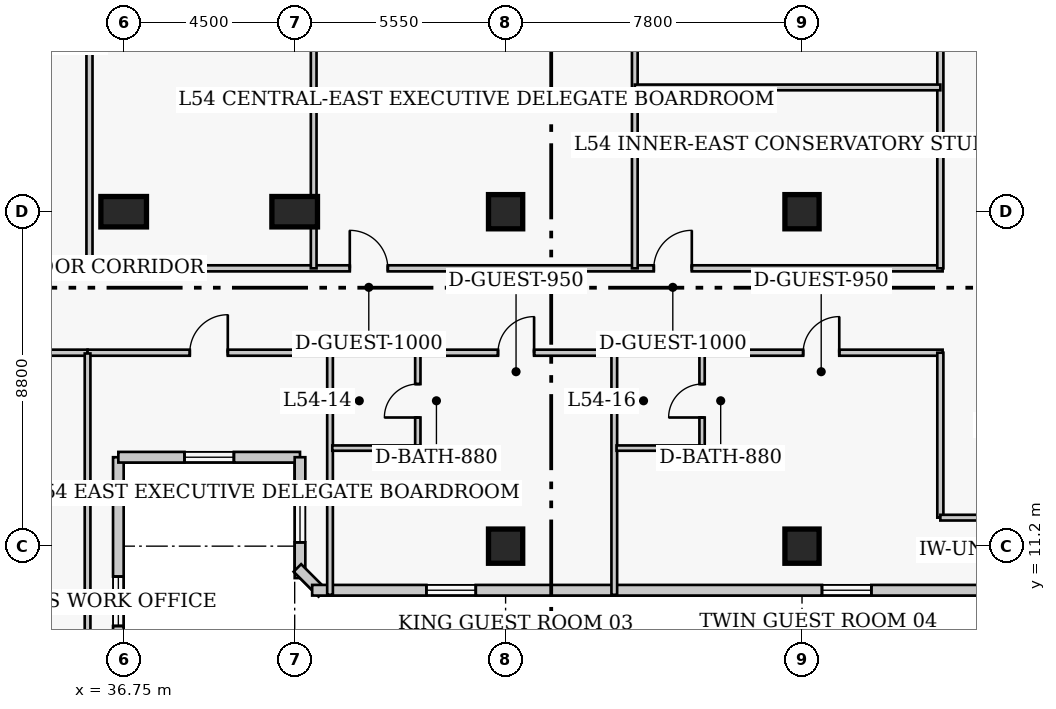
"""IFC4 building model, lengths in metres.
Left out: names, types, materials, properties, quantities, classifications, styles, units other than length and angle.
Written with IfcOpenShell. Run it as: python <this file> out.ifc"""

import sys

from ifc_helpers import new_model, si_unit, direction, frame, frame_2d, origin, origin_2d, place, context, subcontext, project, spatial, rectangle, extrude, element, fill, save


model = new_model("IFC4")
c1 = context("Model", 3, precision=1e-05, world=origin(), true_north=direction((0.0, 1.0)))
c2 = subcontext(c1, "Body", "Model", "MODEL_VIEW")
j1 = project(units=[si_unit("LENGTHUNIT", "METRE"), si_unit("PLANEANGLEUNIT", "RADIAN")], contexts=[c1])
p1 = place(None, origin())
s1 = spatial("IfcSite", under=j1, at=p1, CompositionType="ELEMENT")
p2 = place(p1, origin())
s2 = spatial("IfcBuilding", under=s1, at=p2, CompositionType="ELEMENT")
p3 = place(p2, frame((0.0, 0.0, 216.3)))
s3 = spatial("IfcBuildingStorey", under=s2, at=p3, CompositionType="ELEMENT", Elevation=216.3)
for number, where, z_axis, x_axis in (
    (1, (36.75, 20.0, 0.0), (0.0, 0.0, 1.0), (1.0, 0.0, 0.0)),
    (2, (41.25, 20.0, 0.0), (0.0, 0.0, 1.0), (1.0, 0.0, 0.0)),
):
    element("IfcColumn", number, at=place(p3, frame(where, z_axis=z_axis, x_axis=x_axis)), inside=s3, PredefinedType="COLUMN", context=c2, shape_type="SweptSolid", body=[
        extrude(rectangle(XDim=1.2, YDim=0.8, at=origin_2d()), origin(), (0.0, 0.0, 1.0), 3.9),
    ])
for number, where, z_axis, x_axis in (
    (3, (46.8, 11.2, 0.0), (0.0, 0.0, 1.0), (1.0, 0.0, 0.0)),
    (4, (46.8, 20.0, 0.0), (0.0, 0.0, 1.0), (1.0, 0.0, 0.0)),
    (5, (54.6, 11.2, 0.0), (0.0, 0.0, 1.0), (1.0, 0.0, 0.0)),
    (6, (54.6, 20.0, 0.0), (0.0, 0.0, 1.0), (1.0, 0.0, 0.0)),
):
    element("IfcColumn", number, at=place(p3, frame(where, z_axis=z_axis, x_axis=x_axis)), inside=s3, PredefinedType="COLUMN", context=c2, shape_type="SweptSolid", body=[
        extrude(rectangle(XDim=0.9, YDim=0.9, at=origin_2d()), origin(), (0.0, 0.0, 1.0), 3.9),
    ])
p4 = place(p3, frame((36.61, 5.96, 0.0), z_axis=(0.0, 0.0, 1.0), x_axis=(0.0, 1.0, 0.0)))
e7 = element("IfcWall", 7, at=p4, inside=s3, PredefinedType="SOLIDWALL", context=c2, shape_type="SweptSolid", body=[
    extrude(rectangle(XDim=7.58, YDim=0.28, at=frame_2d((3.79, 0.0))), origin(), (0.0, 0.0, 1.0), 3.65),
])
p5 = place(p4, frame((3.14, 0.0, 0.85)))
e8 = element("IfcOpeningElement", 8, at=p5, cuts=e7, PredefinedType="OPENING", context=c2, shape_type="SweptSolid", body=[
    extrude(rectangle(XDim=1.3, YDim=1.7, at=frame_2d((0.65, 0.85))), frame((0.0, 0.15, 0.0), z_axis=(0.0, -1.0, 0.0), x_axis=(1.0, 0.0, 0.0)), (0.0, 0.0, 1.0), 0.3),
])
p6 = place(p3, frame((36.61, 13.54, 0.0), z_axis=(0.0, 0.0, 1.0), x_axis=(1.0, 0.0, 0.0)))
e9 = element("IfcWall", 9, at=p6, inside=s3, PredefinedType="SOLIDWALL", context=c2, shape_type="SweptSolid", body=[
    extrude(rectangle(XDim=4.78, YDim=0.28, at=frame_2d((2.39, 0.0))), origin(), (0.0, 0.0, 1.0), 3.65),
])
p7 = place(p6, frame((1.74, 0.0, 0.85)))
e10 = element("IfcOpeningElement", 10, at=p7, cuts=e9, PredefinedType="OPENING", context=c2, shape_type="SweptSolid", body=[
    extrude(rectangle(XDim=1.3, YDim=1.7, at=frame_2d((0.65, 0.85))), frame((0.0, 0.15, 0.0), z_axis=(0.0, -1.0, 0.0), x_axis=(1.0, 0.0, 0.0)), (0.0, 0.0, 1.0), 0.3),
])
p8 = place(p3, frame((41.39, 13.54, 0.0), z_axis=(0.0, 0.0, 1.0), x_axis=(0.0, -1.0, 0.0)))
e11 = element("IfcWall", 11, at=p8, inside=s3, PredefinedType="SOLIDWALL", context=c2, shape_type="SweptSolid", body=[
    extrude(rectangle(XDim=3.18, YDim=0.28, at=frame_2d((1.59, 0.0))), origin(), (0.0, 0.0, 1.0), 3.65),
])
p9 = place(p8, frame((0.94, 0.0, 0.85)))
e12 = element("IfcOpeningElement", 12, at=p9, cuts=e11, PredefinedType="OPENING", context=c2, shape_type="SweptSolid", body=[
    extrude(rectangle(XDim=1.3, YDim=1.7, at=frame_2d((0.65, 0.85))), frame((0.0, 0.15, 0.0), z_axis=(0.0, -1.0, 0.0), x_axis=(1.0, 0.0, 0.0)), (0.0, 0.0, 1.0), 0.3),
])
p10 = place(p3, frame((41.321, 10.627, 0.0), z_axis=(0.0, 0.0, 1.0), x_axis=(0.707106781187, -0.707106781187, 0.0)))
e13 = element("IfcWall", 13, at=p10, inside=s3, PredefinedType="SOLIDWALL", context=c2, shape_type="SweptSolid", body=[
    extrude(rectangle(XDim=0.928, YDim=0.28, at=frame_2d((0.464, 0.0))), origin(), (0.0, 0.0, 1.0), 3.65),
])
p11 = place(p3, frame((41.71, 10.04, 0.0), z_axis=(0.0, 0.0, 1.0), x_axis=(1.0, 0.0, 0.0)))
e14 = element("IfcWall", 14, at=p11, inside=s3, PredefinedType="SOLIDWALL", context=c2, shape_type="SweptSolid", body=[
    extrude(rectangle(XDim=25.83, YDim=0.28, at=frame_2d((12.915, 0.0))), origin(), (0.0, 0.0, 1.0), 3.65),
])
p12 = place(p11, frame((3.005, 0.0, 0.85)))
e15 = element("IfcOpeningElement", 15, at=p12, cuts=e14, PredefinedType="OPENING", context=c2, shape_type="SweptSolid", body=[
    extrude(rectangle(XDim=1.3, YDim=1.7, at=frame_2d((0.65, 0.85))), frame((0.0, 0.15, 0.0), z_axis=(0.0, -1.0, 0.0), x_axis=(1.0, 0.0, 0.0)), (0.0, 0.0, 1.0), 0.3),
])
p13 = place(p11, frame((13.415, 0.0, 0.85)))
e16 = element("IfcOpeningElement", 16, at=p13, cuts=e14, PredefinedType="OPENING", context=c2, shape_type="SweptSolid", body=[
    extrude(rectangle(XDim=1.3, YDim=1.7, at=frame_2d((0.65, 0.85))), frame((0.0, 0.15, 0.0), z_axis=(0.0, -1.0, 0.0), x_axis=(1.0, 0.0, 0.0)), (0.0, 0.0, 1.0), 0.3),
])
p14 = place(p11, frame((21.525, 0.0, 0.85)))
e17 = element("IfcOpeningElement", 17, at=p14, cuts=e14, PredefinedType="OPENING", context=c2, shape_type="SweptSolid", body=[
    extrude(rectangle(XDim=1.3, YDim=1.7, at=frame_2d((0.65, 0.85))), frame((0.0, 0.15, 0.0), z_axis=(0.0, -1.0, 0.0), x_axis=(1.0, 0.0, 0.0)), (0.0, 0.0, 1.0), 0.3),
])
p15 = place(p3, frame((35.85, 18.51, 0.0), z_axis=(0.0, 0.0, 1.0), x_axis=(1.0, 0.0, 0.0)))
e18 = element("IfcWall", 18, at=p15, inside=s3, PredefinedType="PARTITIONING", context=c2, shape_type="SweptSolid", body=[
    extrude(rectangle(XDim=22.45, YDim=0.16, at=frame_2d((11.225, 0.0))), origin(), (0.0, 0.0, 1.0), 3.65),
])
p16 = place(p15, frame((6.85, 0.0, 0.0)))
e19 = element("IfcOpeningElement", 19, at=p16, cuts=e18, PredefinedType="OPENING", context=c2, shape_type="SweptSolid", body=[
    extrude(rectangle(XDim=1.0, YDim=2.15, at=frame_2d((0.5, 1.075))), frame((0.0, 0.09, 0.0), z_axis=(0.0, -1.0, 0.0), x_axis=(1.0, 0.0, 0.0)), (0.0, 0.0, 1.0), 0.18),
])
p17 = place(p15, frame((14.85, 0.0, 0.0)))
e20 = element("IfcOpeningElement", 20, at=p17, cuts=e18, PredefinedType="OPENING", context=c2, shape_type="SweptSolid", body=[
    extrude(rectangle(XDim=1.0, YDim=2.15, at=frame_2d((0.5, 1.075))), frame((0.0, 0.09, 0.0), z_axis=(0.0, -1.0, 0.0), x_axis=(1.0, 0.0, 0.0)), (0.0, 0.0, 1.0), 0.18),
])
p18 = place(p3, frame((35.85, 18.51, 0.0), z_axis=(0.0, 0.0, 1.0), x_axis=(0.0, 1.0, 0.0)))
e21 = element("IfcWall", 21, at=p18, inside=s3, PredefinedType="PARTITIONING", context=c2, shape_type="SweptSolid", body=[
    extrude(rectangle(XDim=11.04, YDim=0.16, at=frame_2d((5.52, 0.0))), origin(), (0.0, 0.0, 1.0), 3.65),
])
p19 = place(p3, frame((19.1, 16.29, 0.0), z_axis=(0.0, 0.0, 1.0), x_axis=(1.0, 0.0, 0.0)))
e22 = element("IfcWall", 22, at=p19, inside=s3, PredefinedType="PARTITIONING", context=c2, shape_type="SweptSolid", body=[
    extrude(rectangle(XDim=16.7, YDim=0.16, at=frame_2d((8.35, 0.0))), origin(), (0.0, 0.0, 1.0), 3.65),
])
p20 = place(p19, frame((3.488, 0.0, 0.0)))
e23 = element("IfcOpeningElement", 23, at=p20, cuts=e22, PredefinedType="OPENING", context=c2, shape_type="SweptSolid", body=[
    extrude(rectangle(XDim=1.0, YDim=2.15, at=frame_2d((0.5, 1.075))), frame((0.0, 0.09, 0.0), z_axis=(0.0, -1.0, 0.0), x_axis=(1.0, 0.0, 0.0)), (0.0, 0.0, 1.0), 0.18),
])
p21 = place(p19, frame((9.06, 0.0, 0.0)))
e24 = element("IfcOpeningElement", 24, at=p21, cuts=e22, PredefinedType="OPENING", context=c2, shape_type="SweptSolid", body=[
    extrude(rectangle(XDim=0.95, YDim=2.1, at=frame_2d((0.475, 1.05))), frame((0.0, 0.09, 0.0), z_axis=(0.0, -1.0, 0.0), x_axis=(1.0, 0.0, 0.0)), (0.0, 0.0, 1.0), 0.18),
])
p22 = place(p19, frame((13.427, 0.0, 0.0)))
e25 = element("IfcOpeningElement", 25, at=p22, cuts=e22, PredefinedType="OPENING", context=c2, shape_type="SweptSolid", body=[
    extrude(rectangle(XDim=1.0, YDim=2.15, at=frame_2d((0.5, 1.075))), frame((0.0, 0.09, 0.0), z_axis=(0.0, -1.0, 0.0), x_axis=(1.0, 0.0, 0.0)), (0.0, 0.0, 1.0), 0.18),
])
p23 = place(p3, frame((35.8, 16.29, 0.0), z_axis=(0.0, 0.0, 1.0), x_axis=(1.0, 0.0, 0.0)))
e26 = element("IfcWall", 26, at=p23, inside=s3, PredefinedType="PARTITIONING", context=c2, shape_type="SweptSolid", body=[
    extrude(rectangle(XDim=22.5, YDim=0.16, at=frame_2d((11.25, 0.0))), origin(), (0.0, 0.0, 1.0), 3.65),
])
p24 = place(p23, frame((2.69, 0.0, 0.0)))
e27 = element("IfcOpeningElement", 27, at=p24, cuts=e26, PredefinedType="OPENING", context=c2, shape_type="SweptSolid", body=[
    extrude(rectangle(XDim=1.0, YDim=2.15, at=frame_2d((0.5, 1.075))), frame((0.0, 0.09, 0.0), z_axis=(0.0, -1.0, 0.0), x_axis=(1.0, 0.0, 0.0)), (0.0, 0.0, 1.0), 0.18),
])
p25 = place(p23, frame((10.8, 0.0, 0.0)))
e28 = element("IfcOpeningElement", 28, at=p25, cuts=e26, PredefinedType="OPENING", context=c2, shape_type="SweptSolid", body=[
    extrude(rectangle(XDim=0.95, YDim=2.1, at=frame_2d((0.475, 1.05))), frame((0.0, 0.09, 0.0), z_axis=(0.0, -1.0, 0.0), x_axis=(1.0, 0.0, 0.0)), (0.0, 0.0, 1.0), 0.18),
])
p26 = place(p23, frame((18.83, 0.0, 0.0)))
e29 = element("IfcOpeningElement", 29, at=p26, cuts=e26, PredefinedType="OPENING", context=c2, shape_type="SweptSolid", body=[
    extrude(rectangle(XDim=0.95, YDim=2.1, at=frame_2d((0.475, 1.05))), frame((0.0, 0.09, 0.0), z_axis=(0.0, -1.0, 0.0), x_axis=(1.0, 0.0, 0.0)), (0.0, 0.0, 1.0), 0.18),
])
p27 = place(p3, frame((58.24, 18.51, 0.0), z_axis=(0.0, 0.0, 1.0), x_axis=(0.0, 1.0, 0.0)))
e30 = element("IfcWall", 30, at=p27, inside=s3, PredefinedType="PARTITIONING", context=c2, shape_type="SweptSolid", body=[
    extrude(rectangle(XDim=22.14, YDim=0.16, at=frame_2d((11.07, 0.0))), origin(), (0.0, 0.0, 1.0), 3.65),
])
p28 = place(p3, frame((58.24, 11.95, 0.0), z_axis=(0.0, 0.0, 1.0), x_axis=(0.0, 1.0, 0.0)))
e31 = element("IfcWall", 31, at=p28, inside=s3, PredefinedType="PARTITIONING", context=c2, shape_type="SweptSolid", body=[
    extrude(rectangle(XDim=4.34, YDim=0.16, at=frame_2d((2.17, 0.0))), origin(), (0.0, 0.0, 1.0), 3.65),
])
p29 = place(p3, frame((58.24, 11.95, 0.0), z_axis=(0.0, 0.0, 1.0), x_axis=(1.0, 0.0, 0.0)))
e32 = element("IfcWall", 32, at=p29, inside=s3, PredefinedType="PARTITIONING", context=c2, shape_type="SweptSolid", body=[
    extrude(rectangle(XDim=2.22, YDim=0.15, at=frame_2d((1.11, 0.0))), origin(), (0.0, 0.0, 1.0), 3.65),
])
p30 = place(p3, frame((41.75, 18.51, 0.0), z_axis=(0.0, 0.0, 1.0), x_axis=(0.0, 1.0, 0.0)))
e33 = element("IfcWall", 33, at=p30, inside=s3, PredefinedType="PARTITIONING", context=c2, shape_type="SweptSolid", body=[
    extrude(rectangle(XDim=8.66, YDim=0.15, at=frame_2d((4.33, 0.0))), origin(), (0.0, 0.0, 1.0), 3.65),
])
p31 = place(p3, frame((50.2, 18.51, 0.0), z_axis=(0.0, 0.0, 1.0), x_axis=(0.0, 1.0, 0.0)))
e34 = element("IfcWall", 34, at=p31, inside=s3, PredefinedType="PARTITIONING", context=c2, shape_type="SweptSolid", body=[
    extrude(rectangle(XDim=8.64, YDim=0.15, at=frame_2d((4.32, 0.0))), origin(), (0.0, 0.0, 1.0), 3.65),
])
p32 = place(p3, frame((50.2, 23.27, 0.0), z_axis=(0.0, 0.0, 1.0), x_axis=(1.0, 0.0, 0.0)))
e35 = element("IfcWall", 35, at=p32, inside=s3, PredefinedType="PARTITIONING", context=c2, shape_type="SweptSolid", body=[
    extrude(rectangle(XDim=8.04, YDim=0.15, at=frame_2d((4.02, 0.0))), origin(), (0.0, 0.0, 1.0), 3.65),
])
p33 = place(p3, frame((35.8, 5.52, 0.0), z_axis=(0.0, 0.0, 1.0), x_axis=(0.0, 1.0, 0.0)))
e36 = element("IfcWall", 36, at=p33, inside=s3, PredefinedType="PARTITIONING", context=c2, shape_type="SweptSolid", body=[
    extrude(rectangle(XDim=10.75, YDim=0.15, at=frame_2d((5.375, 0.0))), origin(), (0.0, 0.0, 1.0), 3.65),
])
p34 = place(p3, frame((42.18, 9.92, 0.0), z_axis=(0.0, 0.0, 1.0), x_axis=(0.0, 1.0, 0.0)))
e37 = element("IfcWall", 37, at=p34, inside=s3, PredefinedType="PARTITIONING", context=c2, shape_type="SweptSolid", body=[
    extrude(rectangle(XDim=6.37, YDim=0.15, at=frame_2d((3.185, 0.0))), origin(), (0.0, 0.0, 1.0), 3.65),
])
p35 = place(p3, frame((44.49, 13.78, 0.0), z_axis=(0.0, 0.0, 1.0), x_axis=(0.0, 1.0, 0.0)))
e38 = element("IfcWall", 38, at=p35, inside=s3, PredefinedType="PLUMBINGWALL", context=c2, shape_type="SweptSolid", body=[
    extrude(rectangle(XDim=2.49, YDim=0.14, at=frame_2d((1.245, 0.0))), origin(), (0.0, 0.0, 1.0), 3.65),
])
p36 = place(p35, frame((0.805, 0.0, 0.0)))
e39 = element("IfcOpeningElement", 39, at=p36, cuts=e38, PredefinedType="OPENING", context=c2, shape_type="SweptSolid", body=[
    extrude(rectangle(XDim=0.88, YDim=2.05, at=frame_2d((0.44, 1.025))), frame((0.0, 0.08, 0.0), z_axis=(0.0, -1.0, 0.0), x_axis=(1.0, 0.0, 0.0)), (0.0, 0.0, 1.0), 0.16),
])
p37 = place(p3, frame((42.24, 13.78, 0.0), z_axis=(0.0, 0.0, 1.0), x_axis=(1.0, 0.0, 0.0)))
e40 = element("IfcWall", 40, at=p37, inside=s3, PredefinedType="PLUMBINGWALL", context=c2, shape_type="SweptSolid", body=[
    extrude(rectangle(XDim=2.25, YDim=0.14, at=frame_2d((1.125, 0.0))), origin(), (0.0, 0.0, 1.0), 3.65),
])
p38 = place(p3, frame((49.66, 9.92, 0.0), z_axis=(0.0, 0.0, 1.0), x_axis=(0.0, 1.0, 0.0)))
e41 = element("IfcWall", 41, at=p38, inside=s3, PredefinedType="PARTITIONING", context=c2, shape_type="SweptSolid", body=[
    extrude(rectangle(XDim=6.37, YDim=0.15, at=frame_2d((3.185, 0.0))), origin(), (0.0, 0.0, 1.0), 3.65),
])
p39 = place(p3, frame((51.97, 13.78, 0.0), z_axis=(0.0, 0.0, 1.0), x_axis=(0.0, 1.0, 0.0)))
e42 = element("IfcWall", 42, at=p39, inside=s3, PredefinedType="PLUMBINGWALL", context=c2, shape_type="SweptSolid", body=[
    extrude(rectangle(XDim=2.49, YDim=0.14, at=frame_2d((1.245, 0.0))), origin(), (0.0, 0.0, 1.0), 3.65),
])
p40 = place(p39, frame((0.805, 0.0, 0.0)))
e43 = element("IfcOpeningElement", 43, at=p40, cuts=e42, PredefinedType="OPENING", context=c2, shape_type="SweptSolid", body=[
    extrude(rectangle(XDim=0.88, YDim=2.05, at=frame_2d((0.44, 1.025))), frame((0.0, 0.08, 0.0), z_axis=(0.0, -1.0, 0.0), x_axis=(1.0, 0.0, 0.0)), (0.0, 0.0, 1.0), 0.16),
])
p41 = place(p3, frame((49.72, 13.78, 0.0), z_axis=(0.0, 0.0, 1.0), x_axis=(1.0, 0.0, 0.0)))
e44 = element("IfcWall", 44, at=p41, inside=s3, PredefinedType="PLUMBINGWALL", context=c2, shape_type="SweptSolid", body=[
    extrude(rectangle(XDim=2.25, YDim=0.14, at=frame_2d((1.125, 0.0))), origin(), (0.0, 0.0, 1.0), 3.65),
])
p42 = place(p5, origin())
e45 = element("IfcWindow", 45, at=p42, inside=s3, PartitioningType="SINGLE_PANEL", PredefinedType="WINDOW", context=c2, shape_type="SweptSolid", body=[
    extrude(rectangle(XDim=1.3, YDim=1.7, at=frame_2d((0.65, 0.85))), frame((0.0, 0.03, 0.0), z_axis=(0.0, -1.0, 0.0), x_axis=(1.0, 0.0, 0.0)), (0.0, 0.0, 1.0), 0.06),
])
fill(e8, e45)
p43 = place(p7, origin())
e46 = element("IfcWindow", 46, at=p43, inside=s3, PartitioningType="SINGLE_PANEL", PredefinedType="WINDOW", context=c2, shape_type="SweptSolid", body=[
    extrude(rectangle(XDim=1.3, YDim=1.7, at=frame_2d((0.65, 0.85))), frame((0.0, 0.03, 0.0), z_axis=(0.0, -1.0, 0.0), x_axis=(1.0, 0.0, 0.0)), (0.0, 0.0, 1.0), 0.06),
])
fill(e10, e46)
p44 = place(p9, origin())
e47 = element("IfcWindow", 47, at=p44, inside=s3, PartitioningType="SINGLE_PANEL", PredefinedType="WINDOW", context=c2, shape_type="SweptSolid", body=[
    extrude(rectangle(XDim=1.3, YDim=1.7, at=frame_2d((0.65, 0.85))), frame((0.0, 0.03, 0.0), z_axis=(0.0, -1.0, 0.0), x_axis=(1.0, 0.0, 0.0)), (0.0, 0.0, 1.0), 0.06),
])
fill(e12, e47)
p45 = place(p12, origin())
e48 = element("IfcWindow", 48, at=p45, inside=s3, PartitioningType="SINGLE_PANEL", PredefinedType="WINDOW", context=c2, shape_type="SweptSolid", body=[
    extrude(rectangle(XDim=1.3, YDim=1.7, at=frame_2d((0.65, 0.85))), frame((0.0, 0.03, 0.0), z_axis=(0.0, -1.0, 0.0), x_axis=(1.0, 0.0, 0.0)), (0.0, 0.0, 1.0), 0.06),
])
fill(e15, e48)
p46 = place(p13, origin())
e49 = element("IfcWindow", 49, at=p46, inside=s3, PartitioningType="SINGLE_PANEL", PredefinedType="WINDOW", context=c2, shape_type="SweptSolid", body=[
    extrude(rectangle(XDim=1.3, YDim=1.7, at=frame_2d((0.65, 0.85))), frame((0.0, 0.03, 0.0), z_axis=(0.0, -1.0, 0.0), x_axis=(1.0, 0.0, 0.0)), (0.0, 0.0, 1.0), 0.06),
])
fill(e16, e49)
p47 = place(p16, origin())
e50 = element("IfcDoor", 50, at=p47, inside=s3, OperationType="SINGLE_SWING_LEFT", PredefinedType="DOOR", context=c2, shape_type="SweptSolid", body=[
    extrude(rectangle(XDim=1.0, YDim=2.15, at=frame_2d((0.5, 1.075))), frame((0.0, 0.025, 0.0), z_axis=(0.0, -1.0, 0.0), x_axis=(1.0, 0.0, 0.0)), (0.0, 0.0, 1.0), 0.05),
])
fill(e19, e50)
p48 = place(p17, origin())
e51 = element("IfcDoor", 51, at=p48, inside=s3, OperationType="SINGLE_SWING_RIGHT", PredefinedType="DOOR", context=c2, shape_type="SweptSolid", body=[
    extrude(rectangle(XDim=1.0, YDim=2.15, at=frame_2d((0.5, 1.075))), frame((0.0, 0.025, 0.0), z_axis=(0.0, -1.0, 0.0), x_axis=(1.0, 0.0, 0.0)), (0.0, 0.0, 1.0), 0.05),
])
fill(e20, e51)
p49 = place(p24, origin())
e52 = element("IfcDoor", 52, at=p49, inside=s3, OperationType="SINGLE_SWING_RIGHT", PredefinedType="DOOR", context=c2, shape_type="SweptSolid", body=[
    extrude(rectangle(XDim=1.0, YDim=2.15, at=frame_2d((0.5, 1.075))), frame((0.0, 0.025, 0.0), z_axis=(0.0, -1.0, 0.0), x_axis=(1.0, 0.0, 0.0)), (0.0, 0.0, 1.0), 0.05),
])
fill(e27, e52)
p50 = place(p36, origin())
e53 = element("IfcDoor", 53, at=p50, inside=s3, OperationType="SINGLE_SWING_LEFT", PredefinedType="DOOR", context=c2, shape_type="SweptSolid", body=[
    extrude(rectangle(XDim=0.88, YDim=2.05, at=frame_2d((0.44, 1.025))), frame((0.0, 0.025, 0.0), z_axis=(0.0, -1.0, 0.0), x_axis=(1.0, 0.0, 0.0)), (0.0, 0.0, 1.0), 0.05),
])
fill(e39, e53)
p51 = place(p25, origin())
e54 = element("IfcDoor", 54, at=p51, inside=s3, OperationType="SINGLE_SWING_RIGHT", PredefinedType="DOOR", context=c2, shape_type="SweptSolid", body=[
    extrude(rectangle(XDim=0.95, YDim=2.1, at=frame_2d((0.475, 1.05))), frame((0.0, 0.025, 0.0), z_axis=(0.0, -1.0, 0.0), x_axis=(1.0, 0.0, 0.0)), (0.0, 0.0, 1.0), 0.05),
])
fill(e28, e54)
p52 = place(p40, origin())
e55 = element("IfcDoor", 55, at=p52, inside=s3, OperationType="SINGLE_SWING_LEFT", PredefinedType="DOOR", context=c2, shape_type="SweptSolid", body=[
    extrude(rectangle(XDim=0.88, YDim=2.05, at=frame_2d((0.44, 1.025))), frame((0.0, 0.025, 0.0), z_axis=(0.0, -1.0, 0.0), x_axis=(1.0, 0.0, 0.0)), (0.0, 0.0, 1.0), 0.05),
])
fill(e43, e55)
p53 = place(p26, origin())
e56 = element("IfcDoor", 56, at=p53, inside=s3, OperationType="SINGLE_SWING_RIGHT", PredefinedType="DOOR", context=c2, shape_type="SweptSolid", body=[
    extrude(rectangle(XDim=0.95, YDim=2.1, at=frame_2d((0.475, 1.05))), frame((0.0, 0.025, 0.0), z_axis=(0.0, -1.0, 0.0), x_axis=(1.0, 0.0, 0.0)), (0.0, 0.0, 1.0), 0.05),
])
fill(e29, e56)
save(model, sys.argv[1])
